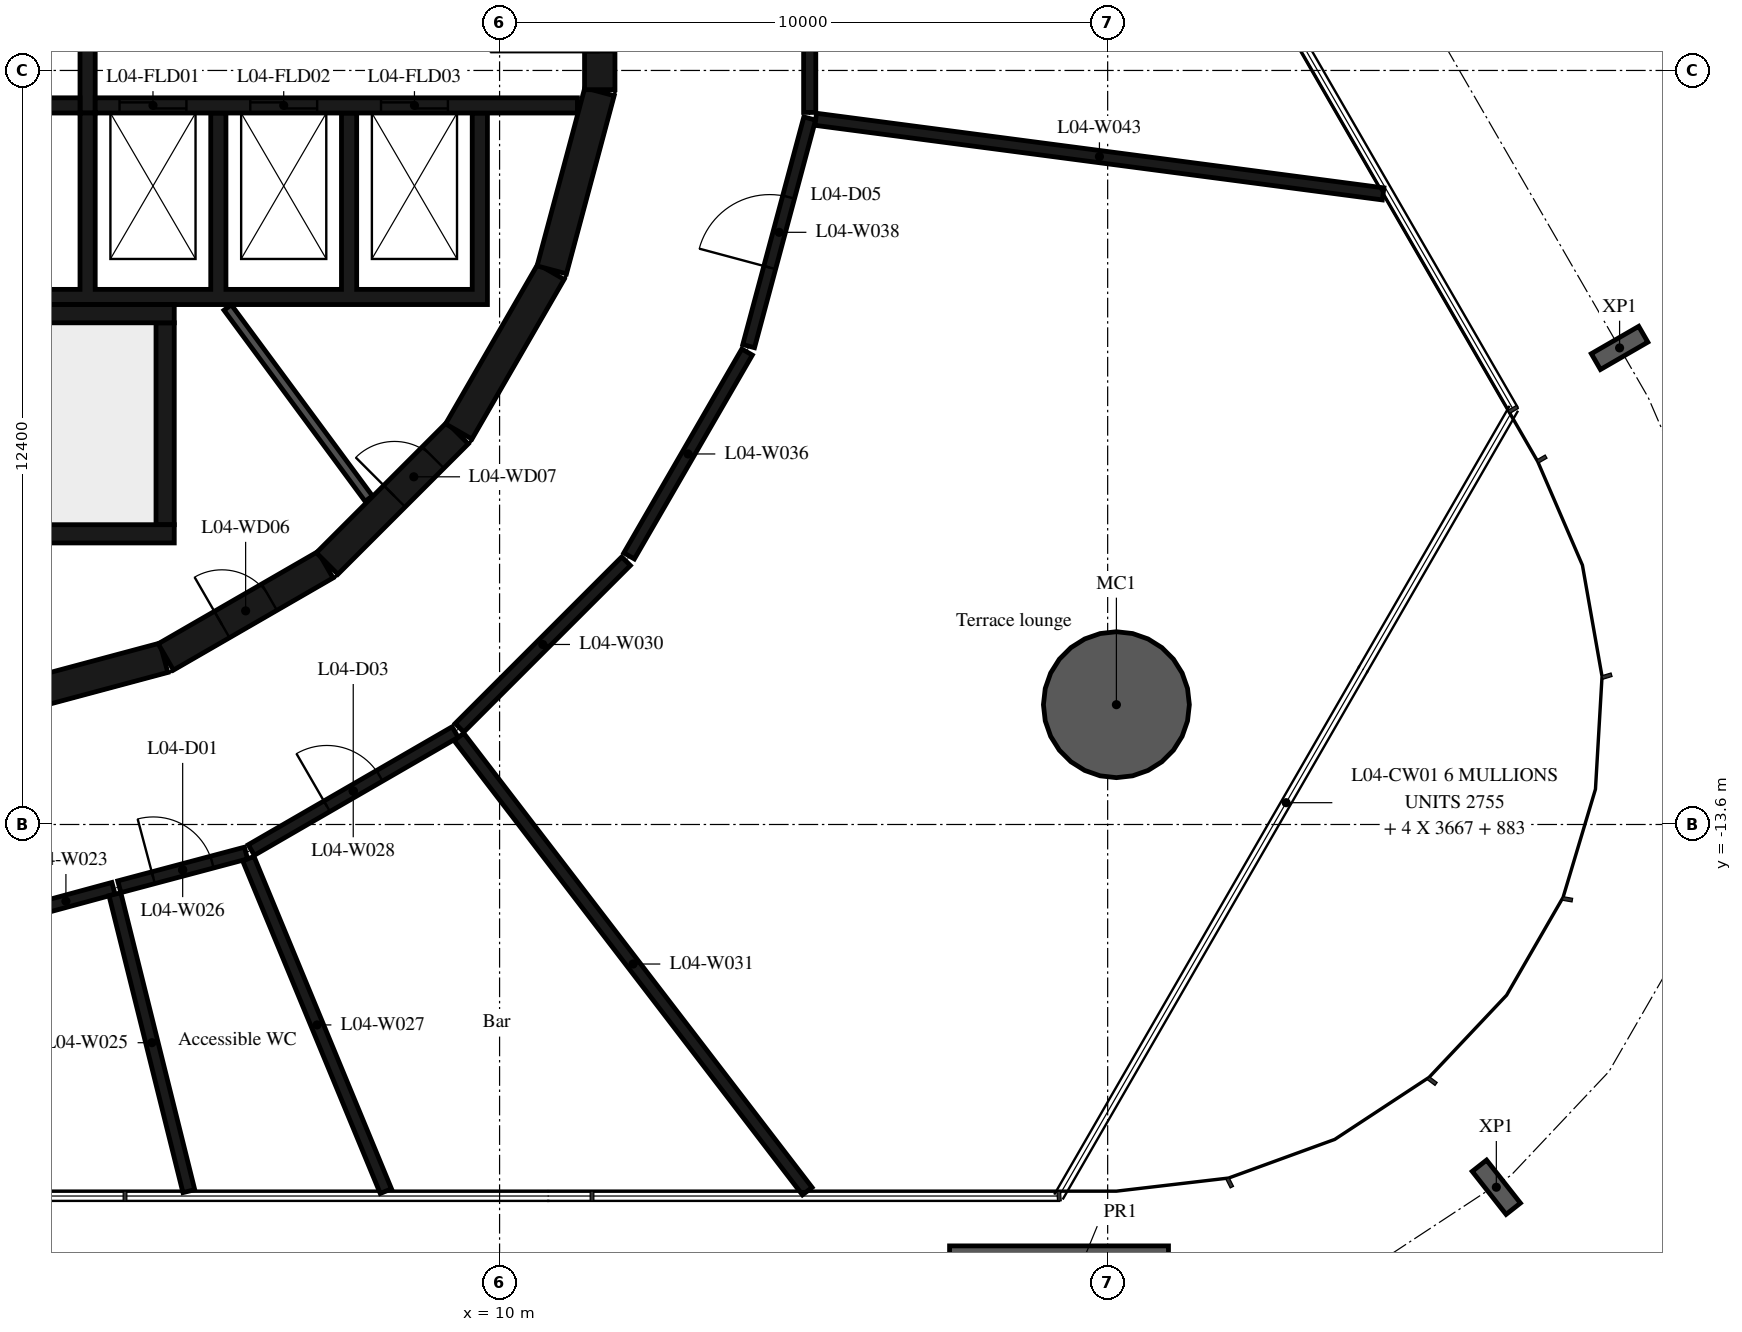
"""IFC4 building model, lengths in metres.
Left out: names, types, materials, properties, quantities, classifications, styles, units other than length and angle.
Written with IfcOpenShell. Run it as: python <this file> out.ifc"""

import sys

from ifc_helpers import new_model, si_unit, direction, frame, frame_2d, origin, origin_2d, place, context, subcontext, project, spatial, polyline, rectangle, hollow_circle, i_section, outline, extrude, element, fill, save


model = new_model("IFC4")
c1 = context("Model", 3, precision=1e-05, world=origin(), true_north=direction((0.0, 1.0)))
c2 = subcontext(c1, "Body", "Model", "MODEL_VIEW")
j1 = project(units=[si_unit("LENGTHUNIT", "METRE"), si_unit("PLANEANGLEUNIT", "RADIAN")], contexts=[c1])
p1 = place(None, origin())
s1 = spatial("IfcSite", under=j1, at=p1, CompositionType="ELEMENT")
p2 = place(p1, origin())
s2 = spatial("IfcBuilding", under=s1, at=p2, CompositionType="ELEMENT")
p3 = place(p2, frame((0.0, 0.0, 23.4)))
s3 = spatial("IfcBuildingStorey", under=s2, at=p3, CompositionType="ELEMENT", Elevation=23.4)
p4 = place(p3, frame((20.144, -11.63, -0.38), z_axis=(0.0, 0.0, 1.0), x_axis=(1.0, 0.0, 0.0)))
e1 = element("IfcColumn", 1, at=p4, inside=s3, PredefinedType="COLUMN", context=c2, shape_type="SweptSolid", body=[
    extrude(hollow_circle(Radius=1.2, WallThickness=0.06, at=origin_2d()), origin(), (0.0, 0.0, 1.0), 4.8),
])
for number, where, z_axis, x_axis in (
    (2, (26.392, -19.565, -0.38), (0.0, 0.0, 1.0), (-0.786, -0.619, 0.0)),
    (3, (28.419, -5.763, -0.38), (0.0, 0.0, 1.0), (0.5, -0.866, 0.0)),
):
    element("IfcColumn", number, at=place(p3, frame(where, z_axis=z_axis, x_axis=x_axis)), inside=s3, PredefinedType="COLUMN", context=c2, shape_type="SweptSolid", body=[
        extrude(i_section(OverallWidth=0.3, OverallDepth=0.9, WebThickness=0.019, FlangeThickness=0.035, FilletRadius=0.03, at=origin_2d()), origin(), (0.0, 0.0, 1.0), 4.8),
    ])
p5 = place(p3, frame((19.2, -21.73, -0.38), z_axis=(0.0, 0.0, 1.0), x_axis=(1.0, 0.0, 0.0)))
e4 = element("IfcColumn", 4, at=p5, inside=s3, PredefinedType="COLUMN", context=c2, shape_type="SweptSolid", body=[
    extrude(rectangle(XDim=3.6, YDim=2.4, at=origin_2d()), origin(), (0.0, 0.0, 1.0), 4.8),
])
p6 = place(p3, frame((1.55, -11.643, 0.0), z_axis=(0.0, 0.0, 1.0), x_axis=(0.965948410781, 0.258734743916, 0.0)))
e5 = element("IfcWall", 5, at=p6, inside=s3, PredefinedType="SHEAR", context=c2, shape_type="SweptSolid", body=[
    extrude(rectangle(XDim=3.033, YDim=0.5, at=frame_2d((1.516, 0.0))), origin(), (0.0, 0.0, 1.0), 4.42),
])
p7 = place(p3, frame((4.51, -10.845, 0.0), z_axis=(0.0, 0.0, 1.0), x_axis=(0.865975092491, 0.500087131594, 0.0)))
e6 = element("IfcWall", 6, at=p7, inside=s3, PredefinedType="SHEAR", context=c2, shape_type="SweptSolid", body=[
    extrude(rectangle(XDim=3.033, YDim=0.5, at=frame_2d((1.516, 0.0))), origin(), (0.0, 0.0, 1.0), 4.42),
])
p8 = place(p7, frame((1.066, 0.0, 0.0)))
e7 = element("IfcOpeningElement", 7, at=p8, cuts=e6, PredefinedType="OPENING", context=c2, shape_type="SweptSolid", body=[
    extrude(rectangle(XDim=0.9, YDim=2.1, at=frame_2d((0.45, 1.05))), frame((0.0, 0.26, 0.0), z_axis=(0.0, -1.0, 0.0), x_axis=(1.0, 0.0, 0.0)), (0.0, 0.0, 1.0), 0.52),
])
p9 = place(p3, frame((7.164, -9.308, 0.0), z_axis=(0.0, 0.0, 1.0), x_axis=(0.707106781187, 0.707106781187, 0.0)))
e8 = element("IfcWall", 8, at=p9, inside=s3, PredefinedType="SHEAR", context=c2, shape_type="SweptSolid", body=[
    extrude(rectangle(XDim=3.032, YDim=0.5, at=frame_2d((1.516, 0.0))), origin(), (0.0, 0.0, 1.0), 4.42),
])
p10 = place(p9, frame((1.566, 0.0, 0.0)))
e9 = element("IfcOpeningElement", 9, at=p10, cuts=e8, PredefinedType="OPENING", context=c2, shape_type="SweptSolid", body=[
    extrude(rectangle(XDim=0.9, YDim=2.1, at=frame_2d((0.45, 1.05))), frame((0.0, 0.26, 0.0), z_axis=(0.0, -1.0, 0.0), x_axis=(1.0, 0.0, 0.0)), (0.0, 0.0, 1.0), 0.52),
])
for number, where, z_axis, x_axis in (
    (10, (9.329, -7.137, 0.0), (0.0, 0.0, 1.0), (0.5, 0.866, 0.0)),
    (11, (10.858, -4.479, 0.0), (0.0, 0.0, 1.0), (0.259, 0.966, 0.0)),
):
    element("IfcWall", number, at=place(p3, frame(where, z_axis=z_axis, x_axis=x_axis)), inside=s3, PredefinedType="SHEAR", context=c2, shape_type="SweptSolid", body=[
        extrude(rectangle(XDim=3.033, YDim=0.5, at=frame_2d((1.516, 0.0))), origin(), (0.0, 0.0, 1.0), 4.42),
    ])
p11 = place(p3, frame((11.647, -1.516, 0.0), z_axis=(0.0, 0.0, 1.0), x_axis=(0.0, 1.0, 0.0)))
e12 = element("IfcWall", 12, at=p11, inside=s3, PredefinedType="SHEAR", context=c2, shape_type="SweptSolid", body=[
    extrude(rectangle(XDim=3.033, YDim=0.5, at=frame_2d((1.516, 0.0))), origin(), (0.0, 0.0, 1.0), 4.42),
])
p12 = place(p11, frame((0.616, 0.0, 0.0)))
e13 = element("IfcOpeningElement", 13, at=p12, cuts=e12, PredefinedType="OPENING", context=c2, shape_type="SweptSolid", body=[
    extrude(rectangle(XDim=1.8, YDim=2.1, at=frame_2d((0.9, 1.05))), frame((0.0, 0.26, 0.0), z_axis=(0.0, -1.0, 0.0), x_axis=(1.0, 0.0, 0.0)), (0.0, 0.0, 1.0), 0.52),
])
p13 = place(p3, frame((-2.4, -5.2, 0.0), z_axis=(0.0, 0.0, 1.0), x_axis=(1.0, 0.0, 0.0)))
e14 = element("IfcWall", 14, at=p13, inside=s3, PredefinedType="SHEAR", context=c2, shape_type="SweptSolid", body=[
    extrude(rectangle(XDim=7.05, YDim=0.3, at=frame_2d((3.525, 0.0))), origin(), (0.0, 0.0, 1.0), 4.42),
])
p14 = place(p3, frame((4.5, -8.67, 0.0), z_axis=(0.0, 0.0, 1.0), x_axis=(0.0, 1.0, 0.0)))
e15 = element("IfcWall", 15, at=p14, inside=s3, PredefinedType="SHEAR", context=c2, shape_type="SweptSolid", body=[
    extrude(rectangle(XDim=3.32, YDim=0.3, at=frame_2d((1.66, 0.0))), origin(), (0.0, 0.0, 1.0), 4.42),
])
p15 = place(p3, frame((0.1, -8.82, 0.0), z_axis=(0.0, 0.0, 1.0), x_axis=(1.0, 0.0, 0.0)))
e16 = element("IfcWall", 16, at=p15, inside=s3, PredefinedType="SHEAR", context=c2, shape_type="SweptSolid", body=[
    extrude(rectangle(XDim=4.55, YDim=0.3, at=frame_2d((2.275, 0.0))), origin(), (0.0, 0.0, 1.0), 4.42),
])
p16 = place(p3, origin())
e17 = element("IfcWall", 17, at=p16, inside=s3, PredefinedType="SHEAR", context=c2, shape_type="SweptSolid", body=[
    extrude(outline(polyline([(9.8, -5.05), (9.8, -4.8), (9.8, -1.9), (9.55, -1.9), (9.55, -4.8), (7.65, -4.8), (7.65, -1.9), (7.4, -1.9), (7.4, -4.8), (5.5, -4.8), (5.5, -1.9), (5.25, -1.9), (5.25, -4.8), (3.35, -4.8), (3.35, -1.9), (3.1, -1.9), (3.1, -4.8), (-5.25, -4.8), (-5.25, -1.9), (-5.5, -1.9), (-5.5, -4.8), (-7.4, -4.8), (-7.4, -1.9), (-7.65, -1.9), (-7.65, -4.8), (-9.55, -4.8), (-9.55, -1.9), (-9.8, -1.9), (-9.8, -4.8), (-9.8, -5.05), (9.8, -5.05)])), origin(), (0.0, 0.0, 1.0), 4.42),
])
p17 = place(p3, frame((-11.28, -1.775, 0.0), z_axis=(0.0, 0.0, 1.0), x_axis=(1.0, 0.0, 0.0)))
e18 = element("IfcWall", 18, at=p17, inside=s3, PredefinedType="SHEAR", context=c2, shape_type="SweptSolid", body=[
    extrude(rectangle(XDim=14.38, YDim=0.25, at=frame_2d((7.19, 0.0))), origin(), (0.0, 0.0, 1.0), 4.42),
])
p18 = place(p17, frame((9.755, 0.0, 0.0)))
e19 = element("IfcOpeningElement", 19, at=p18, cuts=e18, PredefinedType="OPENING", context=c2, shape_type="SweptSolid", body=[
    extrude(rectangle(XDim=0.9, YDim=2.1, at=frame_2d((0.45, 1.05))), frame((0.0, 0.135, 0.0), z_axis=(0.0, -1.0, 0.0), x_axis=(1.0, 0.0, 0.0)), (0.0, 0.0, 1.0), 0.27),
])
p19 = place(p3, frame((3.35, -1.775, 0.0), z_axis=(0.0, 0.0, 1.0), x_axis=(1.0, 0.0, 0.0)))
e20 = element("IfcWall", 20, at=p19, inside=s3, PredefinedType="SHEAR", context=c2, shape_type="SweptSolid", body=[
    extrude(rectangle(XDim=7.93, YDim=0.25, at=frame_2d((3.965, 0.0))), origin(), (0.0, 0.0, 1.0), 4.42),
])
p20 = place(p19, frame((0.4, 0.0, 0.0)))
e21 = element("IfcOpeningElement", 21, at=p20, cuts=e20, PredefinedType="OPENING", context=c2, shape_type="SweptSolid", body=[
    extrude(rectangle(XDim=1.1, YDim=2.4, at=frame_2d((0.55, 1.2))), frame((0.0, 0.135, 0.0), z_axis=(0.0, -1.0, 0.0), x_axis=(1.0, 0.0, 0.0)), (0.0, 0.0, 1.0), 0.27),
])
p21 = place(p19, frame((2.55, 0.0, 0.0)))
e22 = element("IfcOpeningElement", 22, at=p21, cuts=e20, PredefinedType="OPENING", context=c2, shape_type="SweptSolid", body=[
    extrude(rectangle(XDim=1.1, YDim=2.4, at=frame_2d((0.55, 1.2))), frame((0.0, 0.135, 0.0), z_axis=(0.0, -1.0, 0.0), x_axis=(1.0, 0.0, 0.0)), (0.0, 0.0, 1.0), 0.27),
])
p22 = place(p19, frame((4.7, 0.0, 0.0)))
e23 = element("IfcOpeningElement", 23, at=p22, cuts=e20, PredefinedType="OPENING", context=c2, shape_type="SweptSolid", body=[
    extrude(rectangle(XDim=1.1, YDim=2.4, at=frame_2d((0.55, 1.2))), frame((0.0, 0.135, 0.0), z_axis=(0.0, -1.0, 0.0), x_axis=(1.0, 0.0, 0.0)), (0.0, 0.0, 1.0), 0.27),
])
p23 = place(p3, frame((3.225, -1.9, 0.0), z_axis=(0.0, 0.0, 1.0), x_axis=(0.0, 1.0, 0.0)))
e24 = element("IfcWall", 24, at=p23, inside=s3, PredefinedType="SHEAR", context=c2, shape_type="SweptSolid", body=[
    extrude(rectangle(XDim=3.8, YDim=0.25, at=frame_2d((1.9, 0.0))), origin(), (0.0, 0.0, 1.0), 4.42),
])
p24 = place(p3, frame((5.528, -5.098, 0.0), z_axis=(0.0, 0.0, 1.0), x_axis=(0.594034318069, -0.804439698769, 0.0)))
e25 = element("IfcWall", 25, at=p24, inside=s3, PredefinedType="PARTITIONING", context=c2, shape_type="SweptSolid", body=[
    extrude(rectangle(XDim=3.907, YDim=0.15, at=frame_2d((1.953, 0.0))), origin(), (0.0, 0.0, 1.0), 4.42),
])
p25 = place(p3, frame((2.086, -15.074, 0.0), z_axis=(0.0, 0.0, 1.0), x_axis=(0.965166134243, 0.261637790295, 0.0)))
e26 = element("IfcWall", 26, at=p25, inside=s3, PredefinedType="PARTITIONING", context=c2, shape_type="SweptSolid", body=[
    extrude(rectangle(XDim=1.62, YDim=0.2, at=frame_2d((0.81, 0.0))), origin(), (0.0, 0.0, 1.0), 4.42),
])
p26 = place(p3, frame((3.674, -14.747, 0.0), z_axis=(0.0, 0.0, 1.0), x_axis=(0.241622227784, -0.970370392706, 0.0)))
e27 = element("IfcWall", 27, at=p26, inside=s3, PredefinedType="PARTITIONING", context=c2, shape_type="SweptSolid", body=[
    extrude(rectangle(XDim=5.032, YDim=0.2, at=frame_2d((2.516, 0.0))), origin(), (0.0, 0.0, 1.0), 4.42),
])
p27 = place(p3, frame((3.747, -14.624, 0.0), z_axis=(0.0, 0.0, 1.0), x_axis=(0.966396387697, 0.257056456535, 0.0)))
e28 = element("IfcWall", 28, at=p27, inside=s3, PredefinedType="PARTITIONING", context=c2, shape_type="SweptSolid", body=[
    extrude(rectangle(XDim=2.156, YDim=0.2, at=frame_2d((1.078, 0.0))), origin(), (0.0, 0.0, 1.0), 4.42),
])
p28 = place(p27, frame((0.578, 0.0, 0.0)))
e29 = element("IfcOpeningElement", 29, at=p28, cuts=e28, PredefinedType="OPENING", context=c2, shape_type="SweptSolid", body=[
    extrude(rectangle(XDim=1.0, YDim=2.1, at=frame_2d((0.5, 1.05))), frame((0.0, 0.11, 0.0), z_axis=(0.0, -1.0, 0.0), x_axis=(1.0, 0.0, 0.0)), (0.0, 0.0, 1.0), 0.22),
])
p29 = place(p3, frame((5.868, -14.162, 0.0), z_axis=(0.0, 0.0, 1.0), x_axis=(0.382249745869, -0.924059052108, 0.0)))
e30 = element("IfcWall", 30, at=p29, inside=s3, PredefinedType="PARTITIONING", context=c2, shape_type="SweptSolid", body=[
    extrude(rectangle(XDim=5.917, YDim=0.2, at=frame_2d((2.958, 0.0))), origin(), (0.0, 0.0, 1.0), 4.42),
])
p30 = place(p3, frame((5.917, -14.02, 0.0), z_axis=(0.0, 0.0, 1.0), x_axis=(0.865601686425, 0.500733182901, 0.0)))
e31 = element("IfcWall", 31, at=p30, inside=s3, PredefinedType="PARTITIONING", context=c2, shape_type="SweptSolid", body=[
    extrude(rectangle(XDim=3.874, YDim=0.2, at=frame_2d((1.937, 0.0))), origin(), (0.0, 0.0, 1.0), 4.42),
])
p31 = place(p30, frame((1.437, 0.0, 0.0)))
e32 = element("IfcOpeningElement", 32, at=p31, cuts=e31, PredefinedType="OPENING", context=c2, shape_type="SweptSolid", body=[
    extrude(rectangle(XDim=1.0, YDim=2.1, at=frame_2d((0.5, 1.05))), frame((0.0, 0.11, 0.0), z_axis=(0.0, -1.0, 0.0), x_axis=(1.0, 0.0, 0.0)), (0.0, 0.0, 1.0), 0.22),
])
p32 = place(p3, frame((9.341, -12.009, 0.0), z_axis=(0.0, 0.0, 1.0), x_axis=(0.707106781187, 0.707106781187, 0.0)))
e33 = element("IfcWall", 33, at=p32, inside=s3, PredefinedType="PARTITIONING", context=c2, shape_type="SweptSolid", body=[
    extrude(rectangle(XDim=3.874, YDim=0.2, at=frame_2d((1.937, 0.0))), origin(), (0.0, 0.0, 1.0), 4.42),
])
p33 = place(p3, frame((9.331, -12.159, 0.0), z_axis=(0.0, 0.0, 1.0), x_axis=(0.608558385637, -0.793509099677, 0.0)))
e34 = element("IfcWall", 34, at=p33, inside=s3, PredefinedType="PARTITIONING", context=c2, shape_type="SweptSolid", body=[
    extrude(rectangle(XDim=9.415, YDim=0.2, at=frame_2d((4.707, 0.0))), origin(), (0.0, 0.0, 1.0), 4.42),
])
p34 = place(p3, frame((12.13, -9.183, 0.0), z_axis=(0.0, 0.0, 1.0), x_axis=(0.500760497952, 0.865585884642, 0.0)))
e35 = element("IfcWall", 35, at=p34, inside=s3, PredefinedType="PARTITIONING", context=c2, shape_type="SweptSolid", body=[
    extrude(rectangle(XDim=3.874, YDim=0.2, at=frame_2d((1.937, 0.0))), origin(), (0.0, 0.0, 1.0), 4.42),
])
p35 = place(p3, frame((14.096, -5.733, 0.0), z_axis=(0.0, 0.0, 1.0), x_axis=(0.259085569159, 0.96585437197, 0.0)))
e36 = element("IfcWall", 36, at=p35, inside=s3, PredefinedType="PARTITIONING", context=c2, shape_type="SweptSolid", body=[
    extrude(rectangle(XDim=3.876, YDim=0.2, at=frame_2d((1.938, 0.0))), origin(), (0.0, 0.0, 1.0), 4.42),
])
p36 = place(p35, frame((1.338, 0.0, 0.0)))
e37 = element("IfcOpeningElement", 37, at=p36, cuts=e36, PredefinedType="OPENING", context=c2, shape_type="SweptSolid", body=[
    extrude(rectangle(XDim=1.2, YDim=2.1, at=frame_2d((0.6, 1.05))), frame((0.0, 0.11, 0.0), z_axis=(0.0, -1.0, 0.0), x_axis=(1.0, 0.0, 0.0)), (0.0, 0.0, 1.0), 0.22),
])
p37 = place(p3, frame((15.1, -1.89, 0.0), z_axis=(0.0, 0.0, 1.0), x_axis=(0.0, 1.0, 0.0)))
e38 = element("IfcWall", 38, at=p37, inside=s3, PredefinedType="PARTITIONING", context=c2, shape_type="SweptSolid", body=[
    extrude(rectangle(XDim=3.88, YDim=0.2, at=frame_2d((1.94, 0.0))), origin(), (0.0, 0.0, 1.0), 4.42),
])
p38 = place(p37, frame((1.44, 0.0, 0.0)))
e39 = element("IfcOpeningElement", 39, at=p38, cuts=e38, PredefinedType="OPENING", context=c2, shape_type="SweptSolid", body=[
    extrude(rectangle(XDim=1.0, YDim=2.1, at=frame_2d((0.5, 1.05))), frame((0.0, 0.11, 0.0), z_axis=(0.0, -1.0, 0.0), x_axis=(1.0, 0.0, 0.0)), (0.0, 0.0, 1.0), 0.22),
])
p39 = place(p3, frame((15.199, -2.003, 0.0), z_axis=(0.0, 0.0, 1.0), x_axis=(0.991463740717, -0.130382709146, 0.0)))
e40 = element("IfcWall", 40, at=p39, inside=s3, PredefinedType="PARTITIONING", context=c2, shape_type="SweptSolid", body=[
    extrude(rectangle(XDim=9.411, YDim=0.2, at=frame_2d((4.706, 0.0))), origin(), (0.0, 0.0, 1.0), 4.42),
])
p40 = place(p12, origin())
e41 = element("IfcDoor", 41, at=p40, inside=s3, OperationType="DOUBLE_DOOR_SINGLE_SWING", PredefinedType="DOOR", context=c2, shape_type="SweptSolid", body=[
    extrude(rectangle(XDim=1.8, YDim=2.1, at=frame_2d((0.9, 1.05))), frame((0.0, 0.025, 0.0), z_axis=(0.0, -1.0, 0.0), x_axis=(1.0, 0.0, 0.0)), (0.0, 0.0, 1.0), 0.05),
])
fill(e13, e41)
p41 = place(p20, origin())
e42 = element("IfcDoor", 42, at=p41, inside=s3, OperationType="DOUBLE_DOOR_SLIDING", PredefinedType="DOOR", context=c2, shape_type="SweptSolid", body=[
    extrude(rectangle(XDim=1.1, YDim=2.4, at=frame_2d((0.55, 1.2))), frame((0.0, 0.025, 0.0), z_axis=(0.0, -1.0, 0.0), x_axis=(1.0, 0.0, 0.0)), (0.0, 0.0, 1.0), 0.05),
])
fill(e21, e42)
p42 = place(p21, origin())
e43 = element("IfcDoor", 43, at=p42, inside=s3, OperationType="DOUBLE_DOOR_SLIDING", PredefinedType="DOOR", context=c2, shape_type="SweptSolid", body=[
    extrude(rectangle(XDim=1.1, YDim=2.4, at=frame_2d((0.55, 1.2))), frame((0.0, 0.025, 0.0), z_axis=(0.0, -1.0, 0.0), x_axis=(1.0, 0.0, 0.0)), (0.0, 0.0, 1.0), 0.05),
])
fill(e22, e43)
p43 = place(p22, origin())
e44 = element("IfcDoor", 44, at=p43, inside=s3, OperationType="DOUBLE_DOOR_SLIDING", PredefinedType="DOOR", context=c2, shape_type="SweptSolid", body=[
    extrude(rectangle(XDim=1.1, YDim=2.4, at=frame_2d((0.55, 1.2))), frame((0.0, 0.025, 0.0), z_axis=(0.0, -1.0, 0.0), x_axis=(1.0, 0.0, 0.0)), (0.0, 0.0, 1.0), 0.05),
])
fill(e23, e44)
p44 = place(p8, origin())
e45 = element("IfcDoor", 45, at=p44, inside=s3, OperationType="SINGLE_SWING_LEFT", PredefinedType="DOOR", context=c2, shape_type="SweptSolid", body=[
    extrude(rectangle(XDim=0.9, YDim=2.1, at=frame_2d((0.45, 1.05))), frame((0.0, 0.025, 0.0), z_axis=(0.0, -1.0, 0.0), x_axis=(1.0, 0.0, 0.0)), (0.0, 0.0, 1.0), 0.05),
])
fill(e7, e45)
p45 = place(p10, origin())
e46 = element("IfcDoor", 46, at=p45, inside=s3, OperationType="SINGLE_SWING_RIGHT", PredefinedType="DOOR", context=c2, shape_type="SweptSolid", body=[
    extrude(rectangle(XDim=0.9, YDim=2.1, at=frame_2d((0.45, 1.05))), frame((0.0, 0.025, 0.0), z_axis=(0.0, -1.0, 0.0), x_axis=(1.0, 0.0, 0.0)), (0.0, 0.0, 1.0), 0.05),
])
fill(e9, e46)
p46 = place(p28, origin())
e47 = element("IfcDoor", 47, at=p46, inside=s3, OperationType="SINGLE_SWING_LEFT", PredefinedType="DOOR", context=c2, shape_type="SweptSolid", body=[
    extrude(rectangle(XDim=1.0, YDim=2.1, at=frame_2d((0.5, 1.05))), frame((0.0, 0.025, 0.0), z_axis=(0.0, -1.0, 0.0), x_axis=(1.0, 0.0, 0.0)), (0.0, 0.0, 1.0), 0.05),
])
fill(e29, e47)
p47 = place(p31, origin())
e48 = element("IfcDoor", 48, at=p47, inside=s3, OperationType="SINGLE_SWING_LEFT", PredefinedType="DOOR", context=c2, shape_type="SweptSolid", body=[
    extrude(rectangle(XDim=1.0, YDim=2.1, at=frame_2d((0.5, 1.05))), frame((0.0, 0.025, 0.0), z_axis=(0.0, -1.0, 0.0), x_axis=(1.0, 0.0, 0.0)), (0.0, 0.0, 1.0), 0.05),
])
fill(e32, e48)
p48 = place(p36, origin())
e49 = element("IfcDoor", 49, at=p48, inside=s3, OperationType="SINGLE_SWING_LEFT", PredefinedType="DOOR", context=c2, shape_type="SweptSolid", body=[
    extrude(rectangle(XDim=1.2, YDim=2.1, at=frame_2d((0.6, 1.05))), frame((0.0, 0.025, 0.0), z_axis=(0.0, -1.0, 0.0), x_axis=(1.0, 0.0, 0.0)), (0.0, 0.0, 1.0), 0.05),
])
fill(e37, e49)
save(model, sys.argv[1])
